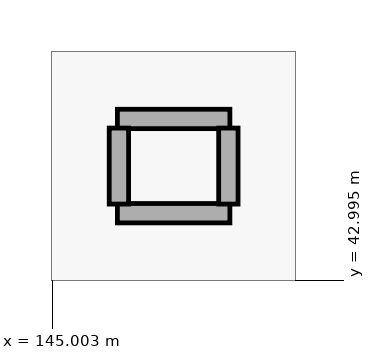
"""IFC4 building model, lengths in metres.
Left out: names, types, materials, properties, quantities, classifications, styles, units other than length and angle.
Written with IfcOpenShell. Run it as: python <this file> out.ifc"""

import sys

from ifc_helpers import new_model, si_unit, direction, frame, frame_2d, origin, place, context, subcontext, project, spatial, rectangle, extrude, element, save


model = new_model("IFC4")
c1 = context("Model", 3, precision=1e-05, world=origin(), true_north=direction((0.0, 1.0)))
c2 = subcontext(c1, "Body", "Model", "MODEL_VIEW")
j1 = project(units=[si_unit("LENGTHUNIT", "METRE"), si_unit("PLANEANGLEUNIT", "RADIAN")], contexts=[c1])
p1 = place(None, origin())
s1 = spatial("IfcSite", under=j1, at=p1, CompositionType="ELEMENT")
p2 = place(p1, origin())
s2 = spatial("IfcBuilding", under=s1, at=p2, CompositionType="ELEMENT")
p3 = place(p2, frame((0.0, 0.0, 5.4)))
s3 = spatial("IfcBuildingStorey", under=s2, at=p3, CompositionType="ELEMENT", Elevation=5.4)
for number, where, z_axis, x_axis in (
    (1, (145.86, 45.12, 0.0), (0.0, 0.0, 1.0), (1.0, 0.0, 0.0)),
    (2, (145.86, 43.88, 0.0), (0.0, 0.0, 1.0), (1.0, 0.0, 0.0)),
):
    element("IfcWall", number, at=place(p3, frame(where, z_axis=z_axis, x_axis=x_axis)), inside=s3, PredefinedType="PARTITIONING", context=c2, shape_type="SweptSolid", body=[
        extrude(rectangle(XDim=1.48, YDim=0.255, at=frame_2d((0.74, 0.0))), origin(), (0.0, 0.0, 1.0), 4.72),
    ])
for number, where, z_axis, x_axis in (
    (3, (145.88, 44.0, 0.0), (0.0, 0.0, 1.0), (0.0, 1.0, 0.0)),
    (4, (147.32, 44.0, 0.0), (0.0, 0.0, 1.0), (0.0, 1.0, 0.0)),
):
    element("IfcWall", number, at=place(p3, frame(where, z_axis=z_axis, x_axis=x_axis)), inside=s3, PredefinedType="PARTITIONING", context=c2, shape_type="SweptSolid", body=[
        extrude(rectangle(XDim=1.0, YDim=0.255, at=frame_2d((0.5, 0.0))), origin(), (0.0, 0.0, 1.0), 4.72),
    ])
save(model, sys.argv[1])
